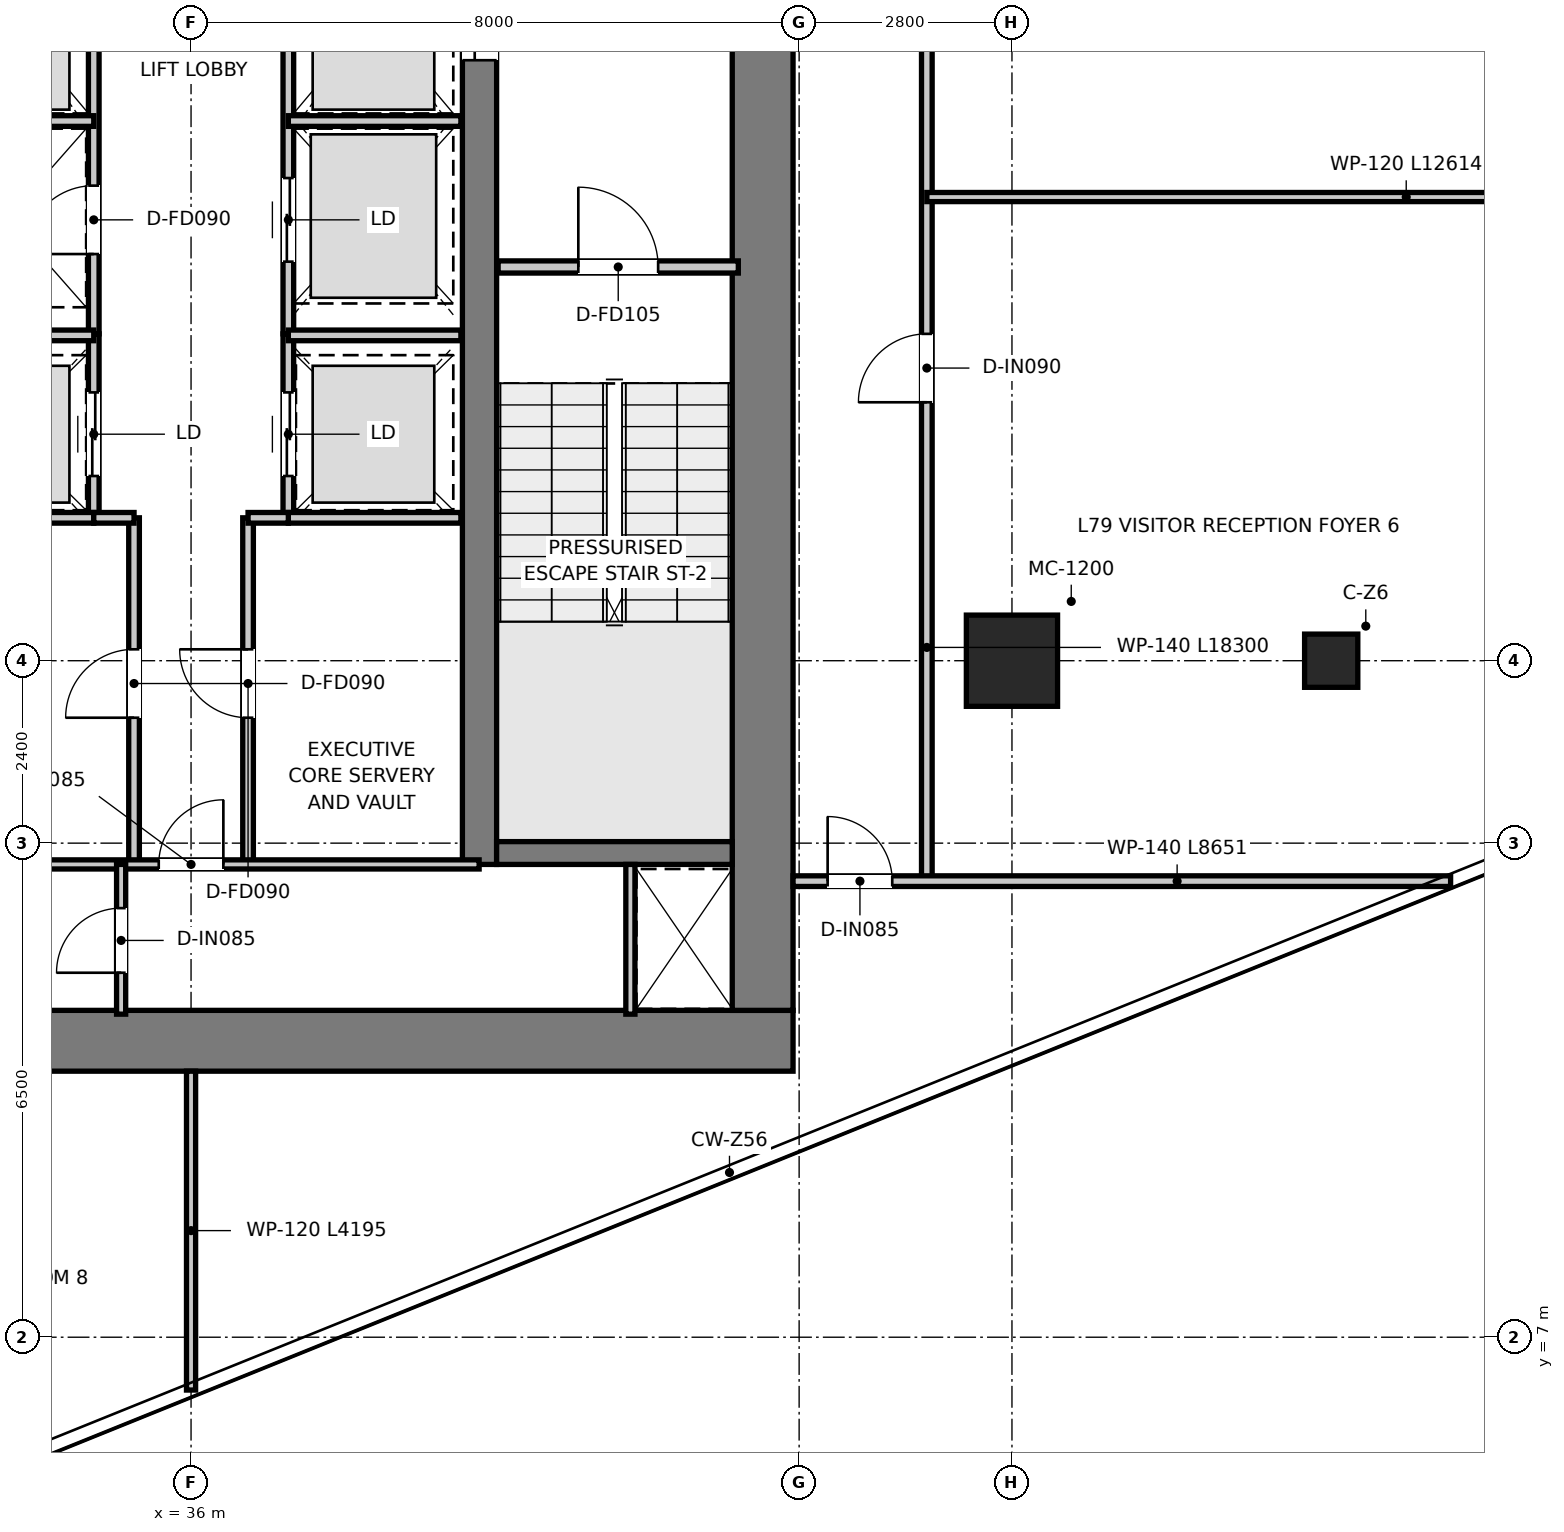
"""IFC4 building model, lengths in metres.
Left out: names, types, materials, properties, quantities, classifications, styles, units other than length and angle.
Written with IfcOpenShell. Run it as: python <this file> out.ifc"""

import sys

from ifc_helpers import new_model, si_unit, direction, frame, frame_2d, origin, origin_2d, place, context, subcontext, project, spatial, rectangle, extrude, source, transform, mapped, element, fill, save


model = new_model("IFC4")
c1 = context("Model", 3, precision=1e-05, world=origin(), true_north=direction((0.0, 1.0)))
c2 = subcontext(c1, "Body", "Model", "MODEL_VIEW")
j1 = project(units=[si_unit("LENGTHUNIT", "METRE"), si_unit("PLANEANGLEUNIT", "RADIAN")], contexts=[c1])
p1 = place(None, origin())
s1 = spatial("IfcSite", under=j1, at=p1, CompositionType="ELEMENT")
p2 = place(p1, origin())
s2 = spatial("IfcBuilding", under=s1, at=p2, CompositionType="ELEMENT")
p3 = place(p2, frame((0.0, 0.0, 323.75)))
s3 = spatial("IfcBuildingStorey", under=s2, at=p3, CompositionType="ELEMENT", Elevation=323.75)
p4 = place(p3, frame((28.08, 10.9, 0.0), z_axis=(0.0, 0.0, 1.0), x_axis=(1.0, 0.0, 0.0)))
e1 = element("IfcWall", 1, at=p4, inside=s3, PredefinedType="SHEAR", context=c2, shape_type="SweptSolid", body=[
    extrude(rectangle(XDim=15.84, YDim=0.8, at=frame_2d((7.92, 0.0))), origin(), (0.0, 0.0, 1.0), 3.95),
])
p5 = place(p3, frame((43.52, 11.3, 0.0), z_axis=(0.0, 0.0, 1.0), x_axis=(0.0, 1.0, 0.0)))
e2 = element("IfcWall", 2, at=p5, inside=s3, PredefinedType="SHEAR", context=c2, shape_type="SweptSolid", body=[
    extrude(rectangle(XDim=14.7, YDim=0.8, at=frame_2d((7.35, 0.0))), origin(), (0.0, 0.0, 1.0), 3.95),
])
p6 = place(p3, frame((39.795, 13.22, 0.0), z_axis=(0.0, 0.0, 1.0), x_axis=(0.0, 1.0, 0.0)))
e3 = element("IfcWall", 3, at=p6, inside=s3, PredefinedType="SHEAR", context=c2, shape_type="SweptSolid", body=[
    extrude(rectangle(XDim=12.78, YDim=0.45, at=frame_2d((6.39, 0.0))), origin(), (0.0, 0.0, 1.0), 3.95),
])
p7 = place(p6, frame((10.58, 0.0, 0.0)))
e4 = element("IfcOpeningElement", 4, at=p7, cuts=e3, PredefinedType="OPENING", context=c2, shape_type="SweptSolid", body=[
    extrude(rectangle(XDim=1.1, YDim=2.15, at=frame_2d((0.55, 1.075))), frame((0.0, 0.235, 0.0), z_axis=(0.0, -1.0, 0.0), x_axis=(1.0, 0.0, 0.0)), (0.0, 0.0, 1.0), 0.47),
])
p8 = place(p3, frame((40.02, 13.37, 0.0), z_axis=(0.0, 0.0, 1.0), x_axis=(1.0, 0.0, 0.0)))
e5 = element("IfcWall", 5, at=p8, inside=s3, PredefinedType="SHEAR", context=c2, shape_type="SweptSolid", body=[
    extrude(rectangle(XDim=3.1, YDim=0.3, at=frame_2d((1.55, 0.0))), origin(), (0.0, 0.0, 1.0), 3.95),
])
m1 = source(origin(), c2, "Body", "SweptSolid", [
    extrude(rectangle(XDim=1.2, YDim=1.2, at=origin_2d()), origin(), (0.0, 0.0, 1.0), 3.95),
])
p9 = place(p3, frame((46.8, 15.9, 0.0), z_axis=(0.0, 0.0, 1.0), x_axis=(1.0, 0.0, 0.0)))
e6 = element("IfcColumn", 6, at=p9, inside=s3, PredefinedType="USERDEFINED", context=c2, shape_type="MappedRepresentation", body=[
    mapped(m1, transform((0.0, 0.0, 0.0), x_axis=(1.0, 0.0, 0.0), y_axis=(0.0, 1.0, 0.0), z_axis=(0.0, 0.0, 1.0), scale=1.0)),
])
m2 = source(origin(), c2, "Body", "SweptSolid", [
    extrude(rectangle(XDim=0.7, YDim=0.7, at=origin_2d()), origin(), (0.0, 0.0, 1.0), 3.95),
])
p10 = place(p3, frame((51.0, 15.9, 0.0), z_axis=(0.0, 0.0, 1.0), x_axis=(1.0, 0.0, 0.0)))
e7 = element("IfcColumn", 7, at=p10, inside=s3, PredefinedType="COLUMN", context=c2, shape_type="MappedRepresentation", body=[
    mapped(m2, transform((0.0, 0.0, 0.0), x_axis=(1.0, 0.0, 0.0), y_axis=(0.0, 1.0, 0.0), z_axis=(0.0, 0.0, 1.0), scale=1.0)),
])
p11 = place(p3, frame((40.04, 21.08, 0.0), z_axis=(0.0, 0.0, 1.0), x_axis=(1.0, 0.0, 0.0)))
e8 = element("IfcWall", 8, at=p11, inside=s3, PredefinedType="PARTITIONING", context=c2, shape_type="SweptSolid", body=[
    extrude(rectangle(XDim=3.16, YDim=0.16, at=frame_2d((1.58, 0.0))), origin(), (0.0, 0.0, 1.0), 3.67),
])
p12 = place(p11, frame((1.055, 0.0, 0.0)))
e9 = element("IfcOpeningElement", 9, at=p12, cuts=e8, PredefinedType="OPENING", context=c2, shape_type="SweptSolid", body=[
    extrude(rectangle(XDim=1.05, YDim=2.1, at=frame_2d((0.525, 1.05))), frame((0.0, 0.09, 0.0), z_axis=(0.0, -1.0, 0.0), x_axis=(1.0, 0.0, 0.0)), (0.0, 0.0, 1.0), 0.18),
])
p13 = place(p3, frame((34.72, 20.2, 0.0), z_axis=(0.0, 0.0, 1.0), x_axis=(0.0, 1.0, 0.0)))
e10 = element("IfcWall", 10, at=p13, inside=s3, PredefinedType="PARTITIONING", context=c2, shape_type="SweptSolid", body=[
    extrude(rectangle(XDim=5.78, YDim=0.14, at=frame_2d((2.89, 0.0))), origin(), (0.0, 0.0, 1.0), 2.82),
])
p14 = place(p13, frame((1.05, 0.0, 0.0)))
e11 = element("IfcOpeningElement", 11, at=p14, cuts=e10, PredefinedType="OPENING", context=c2, shape_type="SweptSolid", body=[
    extrude(rectangle(XDim=0.9, YDim=2.1, at=frame_2d((0.45, 1.05))), frame((0.0, 0.08, 0.0), z_axis=(0.0, -1.0, 0.0), x_axis=(1.0, 0.0, 0.0)), (0.0, 0.0, 1.0), 0.16),
])
p15 = place(p3, frame((37.28, 20.2, 0.0), z_axis=(0.0, 0.0, 1.0), x_axis=(0.0, 1.0, 0.0)))
e12 = element("IfcWall", 12, at=p15, inside=s3, PredefinedType="PARTITIONING", context=c2, shape_type="SweptSolid", body=[
    extrude(rectangle(XDim=5.78, YDim=0.14, at=frame_2d((2.89, 0.0))), origin(), (0.0, 0.0, 1.0), 2.82),
])
p16 = place(p15, frame((0.95, 0.0, 0.0)))
e13 = element("IfcOpeningElement", 13, at=p16, cuts=e12, PredefinedType="OPENING", context=c2, shape_type="SweptSolid", body=[
    extrude(rectangle(XDim=1.1, YDim=2.15, at=frame_2d((0.55, 1.075))), frame((0.0, 0.08, 0.0), z_axis=(0.0, -1.0, 0.0), x_axis=(1.0, 0.0, 0.0)), (0.0, 0.0, 1.0), 0.16),
])
for number, where, z_axis, x_axis in (
    (14, (32.45, 23.0, 0.0), (0.0, 0.0, 1.0), (1.0, 0.0, 0.0)),
    (15, (37.28, 23.0, 0.0), (0.0, 0.0, 1.0), (1.0, 0.0, 0.0)),
):
    element("IfcWall", number, at=place(p3, frame(where, z_axis=z_axis, x_axis=x_axis)), inside=s3, PredefinedType="PARTITIONING", context=c2, shape_type="SweptSolid", body=[
        extrude(rectangle(XDim=2.27, YDim=0.14, at=frame_2d((1.135, 0.0))), origin(), (0.0, 0.0, 1.0), 2.82),
    ])
p17 = place(p3, frame((34.72, 17.78, 0.0), z_axis=(0.0, 0.0, 1.0), x_axis=(0.0, 1.0, 0.0)))
e16 = element("IfcWall", 16, at=p17, inside=s3, PredefinedType="PARTITIONING", context=c2, shape_type="SweptSolid", body=[
    extrude(rectangle(XDim=2.42, YDim=0.14, at=frame_2d((1.21, 0.0))), origin(), (0.0, 0.0, 1.0), 3.67),
])
p18 = place(p17, frame((0.55, 0.0, 0.0)))
e17 = element("IfcOpeningElement", 17, at=p18, cuts=e16, PredefinedType="OPENING", context=c2, shape_type="SweptSolid", body=[
    extrude(rectangle(XDim=1.1, YDim=2.15, at=frame_2d((0.55, 1.075))), frame((0.0, 0.08, 0.0), z_axis=(0.0, -1.0, 0.0), x_axis=(1.0, 0.0, 0.0)), (0.0, 0.0, 1.0), 0.16),
])
p19 = place(p3, frame((37.28, 17.78, 0.0), z_axis=(0.0, 0.0, 1.0), x_axis=(0.0, 1.0, 0.0)))
e18 = element("IfcWall", 18, at=p19, inside=s3, PredefinedType="PARTITIONING", context=c2, shape_type="SweptSolid", body=[
    extrude(rectangle(XDim=2.42, YDim=0.14, at=frame_2d((1.21, 0.0))), origin(), (0.0, 0.0, 1.0), 3.67),
])
p20 = place(p19, frame((0.55, 0.0, 0.0)))
e19 = element("IfcOpeningElement", 19, at=p20, cuts=e18, PredefinedType="OPENING", context=c2, shape_type="SweptSolid", body=[
    extrude(rectangle(XDim=1.1, YDim=2.15, at=frame_2d((0.55, 1.075))), frame((0.0, 0.08, 0.0), z_axis=(0.0, -1.0, 0.0), x_axis=(1.0, 0.0, 0.0)), (0.0, 0.0, 1.0), 0.16),
])
for number, where, z_axis, x_axis in (
    (20, (32.45, 17.78, 0.0), (0.0, 0.0, 1.0), (1.0, 0.0, 0.0)),
    (21, (32.45, 20.18, 0.0), (0.0, 0.0, 1.0), (1.0, 0.0, 0.0)),
    (22, (37.28, 17.78, 0.0), (0.0, 0.0, 1.0), (1.0, 0.0, 0.0)),
    (23, (37.28, 20.18, 0.0), (0.0, 0.0, 1.0), (1.0, 0.0, 0.0)),
):
    element("IfcWall", number, at=place(p3, frame(where, z_axis=z_axis, x_axis=x_axis)), inside=s3, PredefinedType="PARTITIONING", context=c2, shape_type="SweptSolid", body=[
        extrude(rectangle(XDim=2.27, YDim=0.14, at=frame_2d((1.135, 0.0))), origin(), (0.0, 0.0, 1.0), 3.67),
    ])
p21 = place(p3, frame((35.25, 13.22, 0.0), z_axis=(0.0, 0.0, 1.0), x_axis=(0.0, 1.0, 0.0)))
e24 = element("IfcWall", 24, at=p21, inside=s3, PredefinedType="PARTITIONING", context=c2, shape_type="SweptSolid", body=[
    extrude(rectangle(XDim=4.56, YDim=0.14, at=frame_2d((2.28, 0.0))), origin(), (0.0, 0.0, 1.0), 3.67),
])
p22 = place(p21, frame((1.93, 0.0, 0.0)))
e25 = element("IfcOpeningElement", 25, at=p22, cuts=e24, PredefinedType="OPENING", context=c2, shape_type="SweptSolid", body=[
    extrude(rectangle(XDim=0.9, YDim=2.1, at=frame_2d((0.45, 1.05))), frame((0.0, 0.08, 0.0), z_axis=(0.0, -1.0, 0.0), x_axis=(1.0, 0.0, 0.0)), (0.0, 0.0, 1.0), 0.16),
])
p23 = place(p3, frame((34.72, 17.78, 0.0), z_axis=(0.0, 0.0, 1.0), x_axis=(1.0, 0.0, 0.0)))
e26 = element("IfcWall", 26, at=p23, inside=s3, PredefinedType="PARTITIONING", context=c2, shape_type="SweptSolid", body=[
    extrude(rectangle(XDim=0.53, YDim=0.14, at=frame_2d((0.265, 0.0))), origin(), (0.0, 0.0, 1.0), 3.67),
])
p24 = place(p3, frame((36.75, 13.22, 0.0), z_axis=(0.0, 0.0, 1.0), x_axis=(0.0, 1.0, 0.0)))
e27 = element("IfcWall", 27, at=p24, inside=s3, PredefinedType="PARTITIONING", context=c2, shape_type="SweptSolid", body=[
    extrude(rectangle(XDim=4.56, YDim=0.14, at=frame_2d((2.28, 0.0))), origin(), (0.0, 0.0, 1.0), 3.67),
])
p25 = place(p24, frame((1.93, 0.0, 0.0)))
e28 = element("IfcOpeningElement", 28, at=p25, cuts=e27, PredefinedType="OPENING", context=c2, shape_type="SweptSolid", body=[
    extrude(rectangle(XDim=0.9, YDim=2.1, at=frame_2d((0.45, 1.05))), frame((0.0, 0.08, 0.0), z_axis=(0.0, -1.0, 0.0), x_axis=(1.0, 0.0, 0.0)), (0.0, 0.0, 1.0), 0.16),
])
p26 = place(p3, frame((36.75, 17.78, 0.0), z_axis=(0.0, 0.0, 1.0), x_axis=(1.0, 0.0, 0.0)))
e29 = element("IfcWall", 29, at=p26, inside=s3, PredefinedType="PARTITIONING", context=c2, shape_type="SweptSolid", body=[
    extrude(rectangle(XDim=0.53, YDim=0.14, at=frame_2d((0.265, 0.0))), origin(), (0.0, 0.0, 1.0), 3.67),
])
p27 = place(p3, frame((41.78, 11.25, 0.0), z_axis=(0.0, 0.0, 1.0), x_axis=(0.0, 1.0, 0.0)))
e30 = element("IfcWall", 30, at=p27, inside=s3, PredefinedType="PARTITIONING", context=c2, shape_type="SweptSolid", body=[
    extrude(rectangle(XDim=1.97, YDim=0.12, at=frame_2d((0.985, 0.0))), origin(), (0.0, 0.0, 1.0), 3.67),
])
p28 = place(p3, frame((32.21, 13.22, 0.0), z_axis=(0.0, 0.0, 1.0), x_axis=(1.0, 0.0, 0.0)))
e31 = element("IfcWall", 31, at=p28, inside=s3, PredefinedType="PARTITIONING", context=c2, shape_type="SweptSolid", body=[
    extrude(rectangle(XDim=7.58, YDim=0.12, at=frame_2d((3.79, 0.0))), origin(), (0.0, 0.0, 1.0), 3.67),
])
p29 = place(p28, frame((3.365, 0.0, 0.0)))
e32 = element("IfcOpeningElement", 32, at=p29, cuts=e31, PredefinedType="OPENING", context=c2, shape_type="SweptSolid", body=[
    extrude(rectangle(XDim=0.85, YDim=2.1, at=frame_2d((0.425, 1.05))), frame((0.0, 0.07, 0.0), z_axis=(0.0, -1.0, 0.0), x_axis=(1.0, 0.0, 0.0)), (0.0, 0.0, 1.0), 0.14),
])
p30 = place(p3, frame((35.08, 11.25, 0.0), z_axis=(0.0, 0.0, 1.0), x_axis=(0.0, 1.0, 0.0)))
e33 = element("IfcWall", 33, at=p30, inside=s3, PredefinedType="PARTITIONING", context=c2, shape_type="SweptSolid", body=[
    extrude(rectangle(XDim=1.97, YDim=0.12, at=frame_2d((0.985, 0.0))), origin(), (0.0, 0.0, 1.0), 3.67),
])
p31 = place(p30, frame((0.545, 0.0, 0.0)))
e34 = element("IfcOpeningElement", 34, at=p31, cuts=e33, PredefinedType="OPENING", context=c2, shape_type="SweptSolid", body=[
    extrude(rectangle(XDim=0.85, YDim=2.1, at=frame_2d((0.425, 1.05))), frame((0.0, 0.07, 0.0), z_axis=(0.0, -1.0, 0.0), x_axis=(1.0, 0.0, 0.0)), (0.0, 0.0, 1.0), 0.14),
])
p32 = place(p3, frame((45.68, 13.0, 0.0), z_axis=(0.0, 0.0, 1.0), x_axis=(0.0, 1.0, 0.0)))
e35 = element("IfcWall", 35, at=p32, inside=s3, PredefinedType="PARTITIONING", context=c2, shape_type="SweptSolid", body=[
    extrude(rectangle(XDim=15.66, YDim=0.14, at=frame_2d((7.83, 0.0))), origin(), (0.0, 0.0, 1.0), 3.13),
])
p33 = place(p32, frame((14.3, 0.0, 0.0)))
e36 = element("IfcOpeningElement", 36, at=p33, cuts=e35, PredefinedType="OPENING", context=c2, shape_type="SweptSolid", body=[
    extrude(rectangle(XDim=0.9, YDim=2.1, at=frame_2d((0.45, 1.05))), frame((0.0, 0.08, 0.0), z_axis=(0.0, -1.0, 0.0), x_axis=(1.0, 0.0, 0.0)), (0.0, 0.0, 1.0), 0.16),
])
p34 = place(p32, frame((6.3, 0.0, 0.0)))
e37 = element("IfcOpeningElement", 37, at=p34, cuts=e35, PredefinedType="OPENING", context=c2, shape_type="SweptSolid", body=[
    extrude(rectangle(XDim=0.9, YDim=2.1, at=frame_2d((0.45, 1.05))), frame((0.0, 0.08, 0.0), z_axis=(0.0, -1.0, 0.0), x_axis=(1.0, 0.0, 0.0)), (0.0, 0.0, 1.0), 0.16),
])
p35 = place(p32, frame((10.96, 0.0, 0.0)))
e38 = element("IfcOpeningElement", 38, at=p35, cuts=e35, PredefinedType="OPENING", context=c2, shape_type="SweptSolid", body=[
    extrude(rectangle(XDim=0.9, YDim=2.1, at=frame_2d((0.45, 1.05))), frame((0.0, 0.08, 0.0), z_axis=(0.0, -1.0, 0.0), x_axis=(1.0, 0.0, 0.0)), (0.0, 0.0, 1.0), 0.16),
])
p36 = place(p3, frame((43.92, 13.0, 0.0), z_axis=(0.0, 0.0, 1.0), x_axis=(1.0, 0.0, 0.0)))
e39 = element("IfcWall", 39, at=p36, inside=s3, PredefinedType="PARTITIONING", context=c2, shape_type="SweptSolid", body=[
    extrude(rectangle(XDim=8.651, YDim=0.14, at=frame_2d((4.325, 0.0))), origin(), (0.0, 0.0, 1.0), 3.18),
])
p37 = place(p36, frame((0.455, 0.0, 0.0)))
e40 = element("IfcOpeningElement", 40, at=p37, cuts=e39, PredefinedType="OPENING", context=c2, shape_type="SweptSolid", body=[
    extrude(rectangle(XDim=0.85, YDim=2.1, at=frame_2d((0.425, 1.05))), frame((0.0, 0.08, 0.0), z_axis=(0.0, -1.0, 0.0), x_axis=(1.0, 0.0, 0.0)), (0.0, 0.0, 1.0), 0.16),
])
p38 = place(p3, frame((45.68, 22.0, 0.0), z_axis=(0.0, 0.0, 1.0), x_axis=(1.0, 0.0, 0.0)))
e41 = element("IfcWall", 41, at=p38, inside=s3, PredefinedType="PARTITIONING", context=c2, shape_type="SweptSolid", body=[
    extrude(rectangle(XDim=12.614, YDim=0.12, at=frame_2d((6.307, 0.0))), origin(), (0.0, 0.0, 1.0), 3.13),
])
p39 = place(p3, frame((36.0, 6.305, 0.0), z_axis=(0.0, 0.0, 1.0), x_axis=(0.0, 1.0, 0.0)))
e42 = element("IfcWall", 42, at=p39, inside=s3, PredefinedType="PARTITIONING", context=c2, shape_type="SweptSolid", body=[
    extrude(rectangle(XDim=4.195, YDim=0.12, at=frame_2d((2.098, 0.0))), origin(), (0.0, 0.0, 1.0), 3.67),
])
p40 = place(p12, origin())
e43 = element("IfcDoor", 43, at=p40, inside=s3, OperationType="SINGLE_SWING_LEFT", PredefinedType="DOOR", context=c2, shape_type="SweptSolid", body=[
    extrude(rectangle(XDim=1.05, YDim=2.1, at=frame_2d((0.525, 1.05))), frame((0.0, 0.025, 0.0), z_axis=(0.0, -1.0, 0.0), x_axis=(1.0, 0.0, 0.0)), (0.0, 0.0, 1.0), 0.05),
])
fill(e9, e43)
p41 = place(p7, origin())
e44 = element("IfcDoor", 44, at=p41, inside=s3, OperationType="DOUBLE_DOOR_SLIDING", PredefinedType="DOOR", context=c2, shape_type="SweptSolid", body=[
    extrude(rectangle(XDim=1.1, YDim=2.15, at=frame_2d((0.55, 1.075))), frame((0.0, 0.025, 0.0), z_axis=(0.0, -1.0, 0.0), x_axis=(1.0, 0.0, 0.0)), (0.0, 0.0, 1.0), 0.05),
])
fill(e4, e44)
p42 = place(p14, origin())
e45 = element("IfcDoor", 45, at=p42, inside=s3, OperationType="SINGLE_SWING_LEFT", PredefinedType="DOOR", context=c2, shape_type="SweptSolid", body=[
    extrude(rectangle(XDim=0.9, YDim=2.1, at=frame_2d((0.45, 1.05))), frame((0.0, 0.025, 0.0), z_axis=(0.0, -1.0, 0.0), x_axis=(1.0, 0.0, 0.0)), (0.0, 0.0, 1.0), 0.05),
])
fill(e11, e45)
p43 = place(p16, origin())
e46 = element("IfcDoor", 46, at=p43, inside=s3, OperationType="DOUBLE_DOOR_SLIDING", PredefinedType="DOOR", context=c2, shape_type="SweptSolid", body=[
    extrude(rectangle(XDim=1.1, YDim=2.15, at=frame_2d((0.55, 1.075))), frame((0.0, 0.025, 0.0), z_axis=(0.0, -1.0, 0.0), x_axis=(1.0, 0.0, 0.0)), (0.0, 0.0, 1.0), 0.05),
])
fill(e13, e46)
p44 = place(p18, origin())
e47 = element("IfcDoor", 47, at=p44, inside=s3, OperationType="DOUBLE_DOOR_SLIDING", PredefinedType="DOOR", context=c2, shape_type="SweptSolid", body=[
    extrude(rectangle(XDim=1.1, YDim=2.15, at=frame_2d((0.55, 1.075))), frame((0.0, 0.025, 0.0), z_axis=(0.0, -1.0, 0.0), x_axis=(1.0, 0.0, 0.0)), (0.0, 0.0, 1.0), 0.05),
])
fill(e17, e47)
p45 = place(p20, origin())
e48 = element("IfcDoor", 48, at=p45, inside=s3, OperationType="DOUBLE_DOOR_SLIDING", PredefinedType="DOOR", context=c2, shape_type="SweptSolid", body=[
    extrude(rectangle(XDim=1.1, YDim=2.15, at=frame_2d((0.55, 1.075))), frame((0.0, 0.025, 0.0), z_axis=(0.0, -1.0, 0.0), x_axis=(1.0, 0.0, 0.0)), (0.0, 0.0, 1.0), 0.05),
])
fill(e19, e48)
p46 = place(p22, origin())
e49 = element("IfcDoor", 49, at=p46, inside=s3, OperationType="SINGLE_SWING_LEFT", PredefinedType="DOOR", context=c2, shape_type="SweptSolid", body=[
    extrude(rectangle(XDim=0.9, YDim=2.1, at=frame_2d((0.45, 1.05))), frame((0.0, 0.025, 0.0), z_axis=(0.0, -1.0, 0.0), x_axis=(1.0, 0.0, 0.0)), (0.0, 0.0, 1.0), 0.05),
])
fill(e25, e49)
p47 = place(p25, origin())
e50 = element("IfcDoor", 50, at=p47, inside=s3, OperationType="SINGLE_SWING_RIGHT", PredefinedType="DOOR", context=c2, shape_type="SweptSolid", body=[
    extrude(rectangle(XDim=0.9, YDim=2.1, at=frame_2d((0.45, 1.05))), frame((0.0, 0.025, 0.0), z_axis=(0.0, -1.0, 0.0), x_axis=(1.0, 0.0, 0.0)), (0.0, 0.0, 1.0), 0.05),
])
fill(e28, e50)
p48 = place(p29, origin())
e51 = element("IfcDoor", 51, at=p48, inside=s3, OperationType="SINGLE_SWING_RIGHT", PredefinedType="DOOR", context=c2, shape_type="SweptSolid", body=[
    extrude(rectangle(XDim=0.85, YDim=2.1, at=frame_2d((0.425, 1.05))), frame((0.0, 0.025, 0.0), z_axis=(0.0, -1.0, 0.0), x_axis=(1.0, 0.0, 0.0)), (0.0, 0.0, 1.0), 0.05),
])
fill(e32, e51)
p49 = place(p31, origin())
e52 = element("IfcDoor", 52, at=p49, inside=s3, OperationType="SINGLE_SWING_LEFT", PredefinedType="DOOR", context=c2, shape_type="SweptSolid", body=[
    extrude(rectangle(XDim=0.85, YDim=2.1, at=frame_2d((0.425, 1.05))), frame((0.0, 0.025, 0.0), z_axis=(0.0, -1.0, 0.0), x_axis=(1.0, 0.0, 0.0)), (0.0, 0.0, 1.0), 0.05),
])
fill(e34, e52)
p50 = place(p34, origin())
e53 = element("IfcDoor", 53, at=p50, inside=s3, OperationType="SINGLE_SWING_LEFT", PredefinedType="DOOR", context=c2, shape_type="SweptSolid", body=[
    extrude(rectangle(XDim=0.9, YDim=2.1, at=frame_2d((0.45, 1.05))), frame((0.0, 0.025, 0.0), z_axis=(0.0, -1.0, 0.0), x_axis=(1.0, 0.0, 0.0)), (0.0, 0.0, 1.0), 0.05),
])
fill(e37, e53)
p51 = place(p37, origin())
e54 = element("IfcDoor", 54, at=p51, inside=s3, OperationType="SINGLE_SWING_LEFT", PredefinedType="DOOR", context=c2, shape_type="SweptSolid", body=[
    extrude(rectangle(XDim=0.85, YDim=2.1, at=frame_2d((0.425, 1.05))), frame((0.0, 0.025, 0.0), z_axis=(0.0, -1.0, 0.0), x_axis=(1.0, 0.0, 0.0)), (0.0, 0.0, 1.0), 0.05),
])
fill(e40, e54)
save(model, sys.argv[1])
